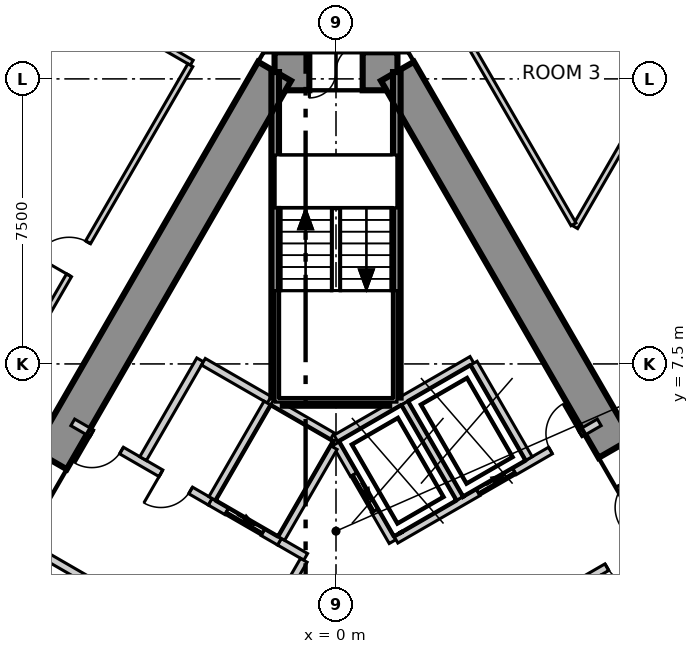
"""IFC4 building model, lengths in metres.
Left out: names, types, materials, properties, quantities, classifications, styles, units other than length and angle.
Written with IfcOpenShell. Run it as: python <this file> out.ifc"""

import sys

from ifc_helpers import new_model, si_unit, direction, frame, frame_2d, origin, place, context, subcontext, project, spatial, polyline, rectangle, outline, extrude, element, fill, save


model = new_model("IFC4")
c1 = context("Model", 3, precision=1e-05, world=origin(), true_north=direction((0.0, 1.0)))
c2 = subcontext(c1, "Body", "Model", "MODEL_VIEW")
j1 = project(units=[si_unit("LENGTHUNIT", "METRE"), si_unit("PLANEANGLEUNIT", "RADIAN")], contexts=[c1])
p1 = place(None, origin())
s1 = spatial("IfcSite", under=j1, at=p1, CompositionType="ELEMENT")
p2 = place(p1, origin())
s2 = spatial("IfcBuilding", under=s1, at=p2, CompositionType="ELEMENT")
p3 = place(p2, frame((0.0, 0.0, 25.3)))
s3 = spatial("IfcBuildingStorey", under=s2, at=p3, CompositionType="ELEMENT", Elevation=25.3)
p4 = place(p3, frame((1.617, 15.2, -0.4), z_axis=(0.0, 0.0, 1.0), x_axis=(-1.0, 0.0, 0.0)))
e1 = element("IfcWall", 1, at=p4, inside=s3, PredefinedType="SHEAR", context=c2, shape_type="SweptSolid", body=[
    extrude(outline(polyline([(-0.288, -0.5), (1.617, -0.5), (3.522, -0.5), (2.945, 0.5), (1.617, 0.5), (0.289, 0.5), (-0.288, -0.5)])), origin(), (0.0, 0.0, 1.0), 5.0),
])
p5 = place(p4, frame((0.917, 0.0, 0.4)))
e2 = element("IfcOpeningElement", 2, at=p5, cuts=e1, PredefinedType="OPENING", context=c2, shape_type="SweptSolid", body=[
    extrude(rectangle(XDim=1.4, YDim=2.1, at=frame_2d((0.7, 1.05))), frame((0.0, 0.51, 0.0), z_axis=(0.0, -1.0, 0.0), x_axis=(1.0, 0.0, 0.0)), (0.0, 0.0, 1.0), 1.02),
])
p6 = place(p3, frame((-1.617, 15.2, -0.4), z_axis=(0.0, 0.0, 1.0), x_axis=(-0.499992141631, -0.866029940768, 0.0)))
e3 = element("IfcWall", 3, at=p6, inside=s3, PredefinedType="SHEAR", context=c2, shape_type="SweptSolid", body=[
    extrude(outline(polyline([(-0.289, -0.499), (1.656, -0.499), (3.601, -0.499), (5.547, -0.499), (7.492, -0.499), (9.437, -0.5), (11.382, -0.5), (13.328, -0.5), (15.273, -0.5), (17.218, -0.5), (19.163, -0.5), (21.109, -0.5), (23.054, -0.5), (24.999, -0.5), (24.422, 0.5), (22.566, 0.5), (20.709, 0.5), (18.853, 0.5), (16.997, 0.5), (15.14, 0.5), (13.284, 0.5), (11.427, 0.5), (9.571, 0.5), (7.715, 0.5), (5.858, 0.5), (4.002, 0.5), (2.146, 0.5), (0.289, 0.5), (-0.289, -0.499)])), origin(), (0.0, 0.0, 1.0), 5.0),
])
p7 = place(p6, frame((11.805, 0.0, 0.4)))
e4 = element("IfcOpeningElement", 4, at=p7, cuts=e3, PredefinedType="OPENING", context=c2, shape_type="SweptSolid", body=[
    extrude(rectangle(XDim=1.1, YDim=2.1, at=frame_2d((0.55, 1.05))), frame((0.0, 0.51, 0.0), z_axis=(0.0, -1.0, 0.0), x_axis=(1.0, 0.0, 0.0)), (0.0, 0.0, 1.0), 1.02),
])
p8 = place(p3, frame((13.972, -6.2, -0.4), z_axis=(0.0, 0.0, 1.0), x_axis=(-0.499992141631, 0.866029940768, 0.0)))
e5 = element("IfcWall", 5, at=p8, inside=s3, PredefinedType="SHEAR", context=c2, shape_type="SweptSolid", body=[
    extrude(outline(polyline([(-0.288, -0.5), (1.657, -0.5), (3.602, -0.5), (5.547, -0.5), (7.493, -0.5), (9.438, -0.5), (11.383, -0.5), (13.328, -0.5), (15.273, -0.5), (17.218, -0.499), (19.164, -0.499), (21.109, -0.499), (23.054, -0.499), (24.999, -0.499), (24.422, 0.5), (22.566, 0.5), (20.709, 0.5), (18.853, 0.5), (16.996, 0.5), (15.14, 0.5), (13.283, 0.5), (11.427, 0.5), (9.57, 0.5), (7.714, 0.5), (5.857, 0.5), (4.001, 0.5), (2.145, 0.5), (0.288, 0.5), (-0.288, -0.5)])), origin(), (0.0, 0.0, 1.0), 5.0),
])
p9 = place(p8, frame((11.455, 0.0, 0.4)))
e6 = element("IfcOpeningElement", 6, at=p9, cuts=e5, PredefinedType="OPENING", context=c2, shape_type="SweptSolid", body=[
    extrude(rectangle(XDim=1.8, YDim=2.1, at=frame_2d((0.9, 1.05))), frame((0.0, 0.51, 0.0), z_axis=(0.0, -1.0, 0.0), x_axis=(1.0, 0.0, 0.0)), (0.0, 0.0, 1.0), 1.02),
])
p10 = place(p3, frame((-8.126, 17.925, 0.0), z_axis=(0.0, 0.0, 1.0), x_axis=(0.866022959057, -0.500004234368, 0.0)))
e7 = element("IfcWall", 7, at=p10, inside=s3, PredefinedType="PARTITIONING", context=c2, shape_type="SweptSolid", body=[
    extrude(rectangle(XDim=5.0, YDim=0.15, at=frame_2d((2.5, 0.0))), origin(), (0.0, 0.0, 1.0), 4.6),
])
p11 = place(p3, frame((-9.716, 5.172, 0.0), z_axis=(0.0, 0.0, 1.0), x_axis=(0.500064951837, 0.865987900576, 0.0)))
e8 = element("IfcWall", 8, at=p11, inside=s3, PredefinedType="PARTITIONING", context=c2, shape_type="SweptSolid", body=[
    extrude(rectangle(XDim=11.765, YDim=0.15, at=frame_2d((5.882, 0.0))), origin(), (0.0, 0.0, 1.0), 4.6),
])
p12 = place(p11, frame((5.382, 0.0, 0.0)))
e9 = element("IfcOpeningElement", 9, at=p12, cuts=e8, PredefinedType="OPENING", context=c2, shape_type="SweptSolid", body=[
    extrude(rectangle(XDim=1.0, YDim=2.1, at=frame_2d((0.5, 1.05))), frame((0.0, 0.085, 0.0), z_axis=(0.0, -1.0, 0.0), x_axis=(1.0, 0.0, 0.0)), (0.0, 0.0, 1.0), 0.17),
])
p13 = place(p3, frame((6.293, 11.099, 0.0), z_axis=(0.0, 0.0, 1.0), x_axis=(0.500016782699, 0.866015714072, 0.0)))
e10 = element("IfcWall", 10, at=p13, inside=s3, PredefinedType="PARTITIONING", context=c2, shape_type="SweptSolid", body=[
    extrude(rectangle(XDim=13.164, YDim=0.15, at=frame_2d((6.582, 0.0))), origin(), (0.0, 0.0, 1.0), 4.6),
])
p14 = place(p13, frame((4.809, 0.0, 0.0)))
e11 = element("IfcOpeningElement", 11, at=p14, cuts=e10, PredefinedType="OPENING", context=c2, shape_type="SweptSolid", body=[
    extrude(rectangle(XDim=1.0, YDim=2.1, at=frame_2d((0.5, 1.05))), frame((0.0, 0.085, 0.0), z_axis=(0.0, -1.0, 0.0), x_axis=(1.0, 0.0, 0.0)), (0.0, 0.0, 1.0), 0.17),
])
p15 = place(p3, frame((2.353, 17.925, 0.0), z_axis=(0.0, 0.0, 1.0), x_axis=(0.499932120426, -0.866064590528, 0.0)))
e12 = element("IfcWall", 12, at=p15, inside=s3, PredefinedType="PARTITIONING", context=c2, shape_type="SweptSolid", body=[
    extrude(rectangle(XDim=7.795, YDim=0.15, at=frame_2d((3.897, 0.0))), origin(), (0.0, 0.0, 1.0), 4.6),
])
p16 = place(p3, frame((-0.002, 5.541, 0.0), z_axis=(0.0, 0.0, 1.0), x_axis=(0.86600155993, 0.500041296494, 0.0)))
e13 = element("IfcWall", 13, at=p16, inside=s3, PredefinedType="SOLIDWALL", context=c2, shape_type="SweptSolid", body=[
    extrude(rectangle(XDim=4.132, YDim=0.2, at=frame_2d((2.066, 0.0))), origin(), (0.0, 0.0, 1.0), 4.6),
])
p17 = place(p3, frame((0.0, 5.4, 0.0), z_axis=(0.0, 0.0, 1.0), x_axis=(0.500103862429, -0.865965430478, 0.0)))
e14 = element("IfcWall", 14, at=p17, inside=s3, PredefinedType="SOLIDWALL", context=c2, shape_type="SweptSolid", body=[
    extrude(rectangle(XDim=2.973, YDim=0.2, at=frame_2d((1.487, 0.0))), origin(), (0.0, 0.0, 1.0), 4.6),
])
p18 = place(p17, frame((0.937, 0.0, 0.0)))
e15 = element("IfcOpeningElement", 15, at=p18, cuts=e14, PredefinedType="OPENING", context=c2, shape_type="SweptSolid", body=[
    extrude(rectangle(XDim=1.1, YDim=2.1, at=frame_2d((0.55, 1.05))), frame((0.0, 0.11, 0.0), z_axis=(0.0, -1.0, 0.0), x_axis=(1.0, 0.0, 0.0)), (0.0, 0.0, 1.0), 0.22),
])
p19 = place(p3, frame((1.578, 2.874, 0.0), z_axis=(0.0, 0.0, 1.0), x_axis=(0.866055259465, 0.499948284879, 0.0)))
e16 = element("IfcWall", 16, at=p19, inside=s3, PredefinedType="SOLIDWALL", context=c2, shape_type="SweptSolid", body=[
    extrude(rectangle(XDim=6.177, YDim=0.2, at=frame_2d((3.088, 0.0))), origin(), (0.0, 0.0, 1.0), 4.6),
])
p20 = place(p19, frame((2.496, 0.0, 0.0)))
e17 = element("IfcOpeningElement", 17, at=p20, cuts=e16, PredefinedType="OPENING", context=c2, shape_type="SweptSolid", body=[
    extrude(rectangle(XDim=1.1, YDim=2.1, at=frame_2d((0.55, 1.05))), frame((0.0, 0.11, 0.0), z_axis=(0.0, -1.0, 0.0), x_axis=(1.0, 0.0, 0.0)), (0.0, 0.0, 1.0), 0.22),
])
p21 = place(p19, frame((4.696, 0.0, 0.0)))
e18 = element("IfcOpeningElement", 18, at=p21, cuts=e16, PredefinedType="OPENING", context=c2, shape_type="SweptSolid", body=[
    extrude(rectangle(XDim=0.9, YDim=2.1, at=frame_2d((0.45, 1.05))), frame((0.0, 0.11, 0.0), z_axis=(0.0, -1.0, 0.0), x_axis=(1.0, 0.0, 0.0)), (0.0, 0.0, 1.0), 0.22),
])
p22 = place(p3, frame((3.278, -0.071, 0.0), z_axis=(0.0, 0.0, 1.0), x_axis=(0.865959795517, 0.500113619639, 0.0)))
e19 = element("IfcWall", 19, at=p22, inside=s3, PredefinedType="SOLIDWALL", context=c2, shape_type="SweptSolid", body=[
    extrude(rectangle(XDim=6.177, YDim=0.2, at=frame_2d((3.088, 0.0))), origin(), (0.0, 0.0, 1.0), 4.6),
])
p23 = place(p22, frame((4.447, 0.0, 0.0)))
e20 = element("IfcOpeningElement", 20, at=p23, cuts=e19, PredefinedType="OPENING", context=c2, shape_type="SweptSolid", body=[
    extrude(rectangle(XDim=1.0, YDim=2.1, at=frame_2d((0.5, 1.05))), frame((0.0, 0.11, 0.0), z_axis=(0.0, -1.0, 0.0), x_axis=(1.0, 0.0, 0.0)), (0.0, 0.0, 1.0), 0.22),
])
for number, where, z_axis, x_axis in (
    (21, (3.626, 7.52, 0.0), (0.0, 0.0, 1.0), (0.5, -0.866, 0.0)),
    (22, (1.807, 6.47, 0.0), (0.0, 0.0, 1.0), (0.5, -0.866, 0.0)),
):
    element("IfcWall", number, at=place(p3, frame(where, z_axis=z_axis, x_axis=x_axis)), inside=s3, PredefinedType="SOLIDWALL", context=c2, shape_type="SweptSolid", body=[
        extrude(rectangle(XDim=2.9, YDim=0.2, at=frame_2d((1.45, 0.0))), origin(), (0.0, 0.0, 1.0), 4.6),
    ])
p24 = place(p3, frame((-8.627, 3.018, 0.0), z_axis=(0.0, 0.0, 1.0), x_axis=(0.866039775641, -0.499975106388, 0.0)))
e23 = element("IfcWall", 23, at=p24, inside=s3, PredefinedType="SOLIDWALL", context=c2, shape_type="SweptSolid", body=[
    extrude(rectangle(XDim=4.182, YDim=0.2, at=frame_2d((2.091, 0.0))), origin(), (0.0, 0.0, 1.0), 4.6),
])
p25 = place(p24, frame((2.58, 0.0, 0.0)))
e24 = element("IfcOpeningElement", 24, at=p25, cuts=e23, PredefinedType="OPENING", context=c2, shape_type="SweptSolid", body=[
    extrude(rectangle(XDim=1.1, YDim=2.1, at=frame_2d((0.55, 1.05))), frame((0.0, 0.11, 0.0), z_axis=(0.0, -1.0, 0.0), x_axis=(1.0, 0.0, 0.0)), (0.0, 0.0, 1.0), 0.22),
])
p26 = place(p3, frame((-6.927, 5.962, 0.0), z_axis=(0.0, 0.0, 1.0), x_axis=(0.866065051207, -0.49993132236, 0.0)))
e25 = element("IfcWall", 25, at=p26, inside=s3, PredefinedType="SOLIDWALL", context=c2, shape_type="SweptSolid", body=[
    extrude(rectangle(XDim=4.182, YDim=0.2, at=frame_2d((2.091, 0.0))), origin(), (0.0, 0.0, 1.0), 4.6),
])
p27 = place(p26, frame((2.68, 0.0, 0.0)))
e26 = element("IfcOpeningElement", 26, at=p27, cuts=e25, PredefinedType="OPENING", context=c2, shape_type="SweptSolid", body=[
    extrude(rectangle(XDim=0.9, YDim=2.1, at=frame_2d((0.45, 1.05))), frame((0.0, 0.11, 0.0), z_axis=(0.0, -1.0, 0.0), x_axis=(1.0, 0.0, 0.0)), (0.0, 0.0, 1.0), 0.22),
])
p28 = place(p26, frame((0.58, 0.0, 0.0)))
e27 = element("IfcOpeningElement", 27, at=p28, cuts=e25, PredefinedType="OPENING", context=c2, shape_type="SweptSolid", body=[
    extrude(rectangle(XDim=0.9, YDim=2.1, at=frame_2d((0.45, 1.05))), frame((0.0, 0.11, 0.0), z_axis=(0.0, -1.0, 0.0), x_axis=(1.0, 0.0, 0.0)), (0.0, 0.0, 1.0), 0.22),
])
p29 = place(p3, frame((-1.488, 2.822, 0.0), z_axis=(0.0, 0.0, 1.0), x_axis=(0.866236612152, -0.499633997809, 0.0)))
e28 = element("IfcWall", 28, at=p29, inside=s3, PredefinedType="SOLIDWALL", context=c2, shape_type="SweptSolid", body=[
    extrude(rectangle(XDim=0.796, YDim=0.2, at=frame_2d((0.398, 0.0))), origin(), (0.0, 0.0, 1.0), 4.6),
])
p30 = place(p3, frame((-5.076, 5.009, 0.0), z_axis=(0.0, 0.0, 1.0), x_axis=(0.50002537861, 0.866010750942, 0.0)))
e29 = element("IfcWall", 29, at=p30, inside=s3, PredefinedType="SOLIDWALL", context=c2, shape_type="SweptSolid", body=[
    extrude(rectangle(XDim=3.0, YDim=0.2, at=frame_2d((1.5, 0.0))), origin(), (0.0, 0.0, 1.0), 4.6),
])
p31 = place(p3, frame((-3.489, 7.557, 0.0), z_axis=(0.0, 0.0, 1.0), x_axis=(0.866010750942, -0.50002537861, 0.0)))
e30 = element("IfcWall", 30, at=p31, inside=s3, PredefinedType="SOLIDWALL", context=c2, shape_type="SweptSolid", body=[
    extrude(rectangle(XDim=2.0, YDim=0.2, at=frame_2d((1.0, 0.0))), origin(), (0.0, 0.0, 1.0), 4.6),
])
p32 = place(p3, frame((-2.444, -0.433, 0.0), z_axis=(0.0, 0.0, 1.0), x_axis=(0.500035624827, 0.866004834804, 0.0)))
e31 = element("IfcWall", 31, at=p32, inside=s3, PredefinedType="SOLIDWALL", context=c2, shape_type="SweptSolid", body=[
    extrude(rectangle(XDim=3.194, YDim=0.2, at=frame_2d((1.597, 0.0))), origin(), (0.0, 0.0, 1.0), 4.6),
])
p33 = place(p3, frame((-3.309, 3.873, 0.0), z_axis=(0.0, 0.0, 1.0), x_axis=(0.866098583652, -0.499873227325, 0.0)))
e32 = element("IfcWall", 32, at=p33, inside=s3, PredefinedType="SOLIDWALL", context=c2, shape_type="SweptSolid", body=[
    extrude(rectangle(XDim=2.103, YDim=0.2, at=frame_2d((1.051, 0.0))), origin(), (0.0, 0.0, 1.0), 4.6),
])
p34 = place(p33, frame((0.502, 0.0, 0.0)))
e33 = element("IfcOpeningElement", 33, at=p34, cuts=e32, PredefinedType="OPENING", context=c2, shape_type="SweptSolid", body=[
    extrude(rectangle(XDim=1.1, YDim=2.1, at=frame_2d((0.55, 1.05))), frame((0.0, 0.11, 0.0), z_axis=(0.0, -1.0, 0.0), x_axis=(1.0, 0.0, 0.0)), (0.0, 0.0, 1.0), 0.22),
])
p35 = place(p3, frame((-3.257, 3.959, 0.0), z_axis=(0.0, 0.0, 1.0), x_axis=(0.50012328804, 0.865954211699, 0.0)))
e34 = element("IfcWall", 34, at=p35, inside=s3, PredefinedType="SOLIDWALL", context=c2, shape_type="SweptSolid", body=[
    extrude(rectangle(XDim=2.9, YDim=0.2, at=frame_2d((1.45, 0.0))), origin(), (0.0, 0.0, 1.0), 4.6),
])
p36 = place(p3, frame((-1.67, 6.507, 0.0), z_axis=(0.0, 0.0, 1.0), x_axis=(0.865941441609, -0.500145398563, 0.0)))
e35 = element("IfcWall", 35, at=p36, inside=s3, PredefinedType="SOLIDWALL", context=c2, shape_type="SweptSolid", body=[
    extrude(rectangle(XDim=1.815, YDim=0.2, at=frame_2d((0.908, 0.0))), origin(), (0.0, 0.0, 1.0), 4.6),
])
p37 = place(p3, frame((-1.438, 2.909, 0.0), z_axis=(0.0, 0.0, 1.0), x_axis=(0.499829630636, 0.866123744241, 0.0)))
e36 = element("IfcWall", 36, at=p37, inside=s3, PredefinedType="SOLIDWALL", context=c2, shape_type="SweptSolid", body=[
    extrude(rectangle(XDim=2.761, YDim=0.2, at=frame_2d((1.38, 0.0))), origin(), (0.0, 0.0, 1.0), 4.6),
])
p38 = place(p3, frame((1.6, 6.615, 0.0), z_axis=(0.0, 0.0, 1.0), x_axis=(0.0, 1.0, 0.0)))
e37 = element("IfcWall", 37, at=p38, inside=s3, PredefinedType="SOLIDWALL", context=c2, shape_type="SweptSolid", body=[
    extrude(rectangle(XDim=8.565, YDim=0.2, at=frame_2d((4.282, 0.0))), origin(), (0.0, 0.0, 1.0), 4.6),
])
p39 = place(p3, frame((-1.4, 6.5, 0.0), z_axis=(0.0, 0.0, 1.0), x_axis=(1.0, 0.0, 0.0)))
e38 = element("IfcWall", 38, at=p39, inside=s3, PredefinedType="SOLIDWALL", context=c2, shape_type="SweptSolid", body=[
    extrude(rectangle(XDim=2.8, YDim=0.2, at=frame_2d((1.4, 0.0))), origin(), (0.0, 0.0, 1.0), 4.6),
])
p40 = place(p3, frame((-1.6, 6.615, 0.0), z_axis=(0.0, 0.0, 1.0), x_axis=(0.0, 1.0, 0.0)))
e39 = element("IfcWall", 39, at=p40, inside=s3, PredefinedType="SOLIDWALL", context=c2, shape_type="SweptSolid", body=[
    extrude(rectangle(XDim=8.565, YDim=0.2, at=frame_2d((4.282, 0.0))), origin(), (0.0, 0.0, 1.0), 4.6),
])
p41 = place(p18, origin())
e40 = element("IfcDoor", 40, at=p41, inside=s3, OperationType="SLIDING_TO_LEFT", PredefinedType="DOOR", context=c2, shape_type="SweptSolid", body=[
    extrude(rectangle(XDim=1.1, YDim=2.1, at=frame_2d((0.55, 1.05))), frame((0.0, 0.025, 0.0), z_axis=(0.0, -1.0, 0.0), x_axis=(1.0, 0.0, 0.0)), (0.0, 0.0, 1.0), 0.05),
])
fill(e15, e40)
p42 = place(p20, origin())
e41 = element("IfcDoor", 41, at=p42, inside=s3, OperationType="SLIDING_TO_LEFT", PredefinedType="DOOR", context=c2, shape_type="SweptSolid", body=[
    extrude(rectangle(XDim=1.1, YDim=2.1, at=frame_2d((0.55, 1.05))), frame((0.0, 0.025, 0.0), z_axis=(0.0, -1.0, 0.0), x_axis=(1.0, 0.0, 0.0)), (0.0, 0.0, 1.0), 0.05),
])
fill(e17, e41)
p43 = place(p34, origin())
e42 = element("IfcDoor", 42, at=p43, inside=s3, OperationType="SLIDING_TO_LEFT", PredefinedType="DOOR", context=c2, shape_type="SweptSolid", body=[
    extrude(rectangle(XDim=1.1, YDim=2.1, at=frame_2d((0.55, 1.05))), frame((0.0, 0.025, 0.0), z_axis=(0.0, -1.0, 0.0), x_axis=(1.0, 0.0, 0.0)), (0.0, 0.0, 1.0), 0.05),
])
fill(e33, e42)
p44 = place(p27, origin())
e43 = element("IfcDoor", 43, at=p44, inside=s3, OperationType="SINGLE_SWING_LEFT", PredefinedType="DOOR", context=c2, shape_type="SweptSolid", body=[
    extrude(rectangle(XDim=0.9, YDim=2.1, at=frame_2d((0.45, 1.05))), frame((0.0, 0.025, 0.0), z_axis=(0.0, -1.0, 0.0), x_axis=(1.0, 0.0, 0.0)), (0.0, 0.0, 1.0), 0.05),
])
fill(e26, e43)
p45 = place(p12, origin())
e44 = element("IfcDoor", 44, at=p45, inside=s3, OperationType="SINGLE_SWING_RIGHT", PredefinedType="DOOR", context=c2, shape_type="SweptSolid", body=[
    extrude(rectangle(XDim=1.0, YDim=2.1, at=frame_2d((0.5, 1.05))), frame((0.0, 0.025, 0.0), z_axis=(0.0, -1.0, 0.0), x_axis=(1.0, 0.0, 0.0)), (0.0, 0.0, 1.0), 0.05),
])
fill(e9, e44)
p46 = place(p9, origin())
e45 = element("IfcDoor", 45, at=p46, inside=s3, OperationType="DOUBLE_DOOR_SINGLE_SWING", PredefinedType="DOOR", context=c2, shape_type="SweptSolid", body=[
    extrude(rectangle(XDim=1.8, YDim=2.1, at=frame_2d((0.9, 1.05))), frame((0.0, 0.025, 0.0), z_axis=(0.0, -1.0, 0.0), x_axis=(1.0, 0.0, 0.0)), (0.0, 0.0, 1.0), 0.05),
])
fill(e6, e45)
p47 = place(p5, origin())
e46 = element("IfcDoor", 46, at=p47, inside=s3, OperationType="DOUBLE_DOOR_SINGLE_SWING", PredefinedType="DOOR", context=c2, shape_type="SweptSolid", body=[
    extrude(rectangle(XDim=1.4, YDim=2.1, at=frame_2d((0.7, 1.05))), frame((0.0, 0.025, 0.0), z_axis=(0.0, -1.0, 0.0), x_axis=(1.0, 0.0, 0.0)), (0.0, 0.0, 1.0), 0.05),
])
fill(e2, e46)
p48 = place(p28, origin())
e47 = element("IfcDoor", 47, at=p48, inside=s3, OperationType="SINGLE_SWING_LEFT", PredefinedType="DOOR", context=c2, shape_type="SweptSolid", body=[
    extrude(rectangle(XDim=0.9, YDim=2.1, at=frame_2d((0.45, 1.05))), frame((0.0, 0.025, 0.0), z_axis=(0.0, -1.0, 0.0), x_axis=(1.0, 0.0, 0.0)), (0.0, 0.0, 1.0), 0.05),
])
fill(e27, e47)
p49 = place(p21, origin())
e48 = element("IfcDoor", 48, at=p49, inside=s3, OperationType="SINGLE_SWING_LEFT", PredefinedType="DOOR", context=c2, shape_type="SweptSolid", body=[
    extrude(rectangle(XDim=0.9, YDim=2.1, at=frame_2d((0.45, 1.05))), frame((0.0, 0.025, 0.0), z_axis=(0.0, -1.0, 0.0), x_axis=(1.0, 0.0, 0.0)), (0.0, 0.0, 1.0), 0.05),
])
fill(e18, e48)
p50 = place(p23, origin())
e49 = element("IfcDoor", 49, at=p50, inside=s3, OperationType="SINGLE_SWING_RIGHT", PredefinedType="DOOR", context=c2, shape_type="SweptSolid", body=[
    extrude(rectangle(XDim=1.0, YDim=2.1, at=frame_2d((0.5, 1.05))), frame((0.0, 0.025, 0.0), z_axis=(0.0, -1.0, 0.0), x_axis=(1.0, 0.0, 0.0)), (0.0, 0.0, 1.0), 0.05),
])
fill(e20, e49)
save(model, sys.argv[1])
